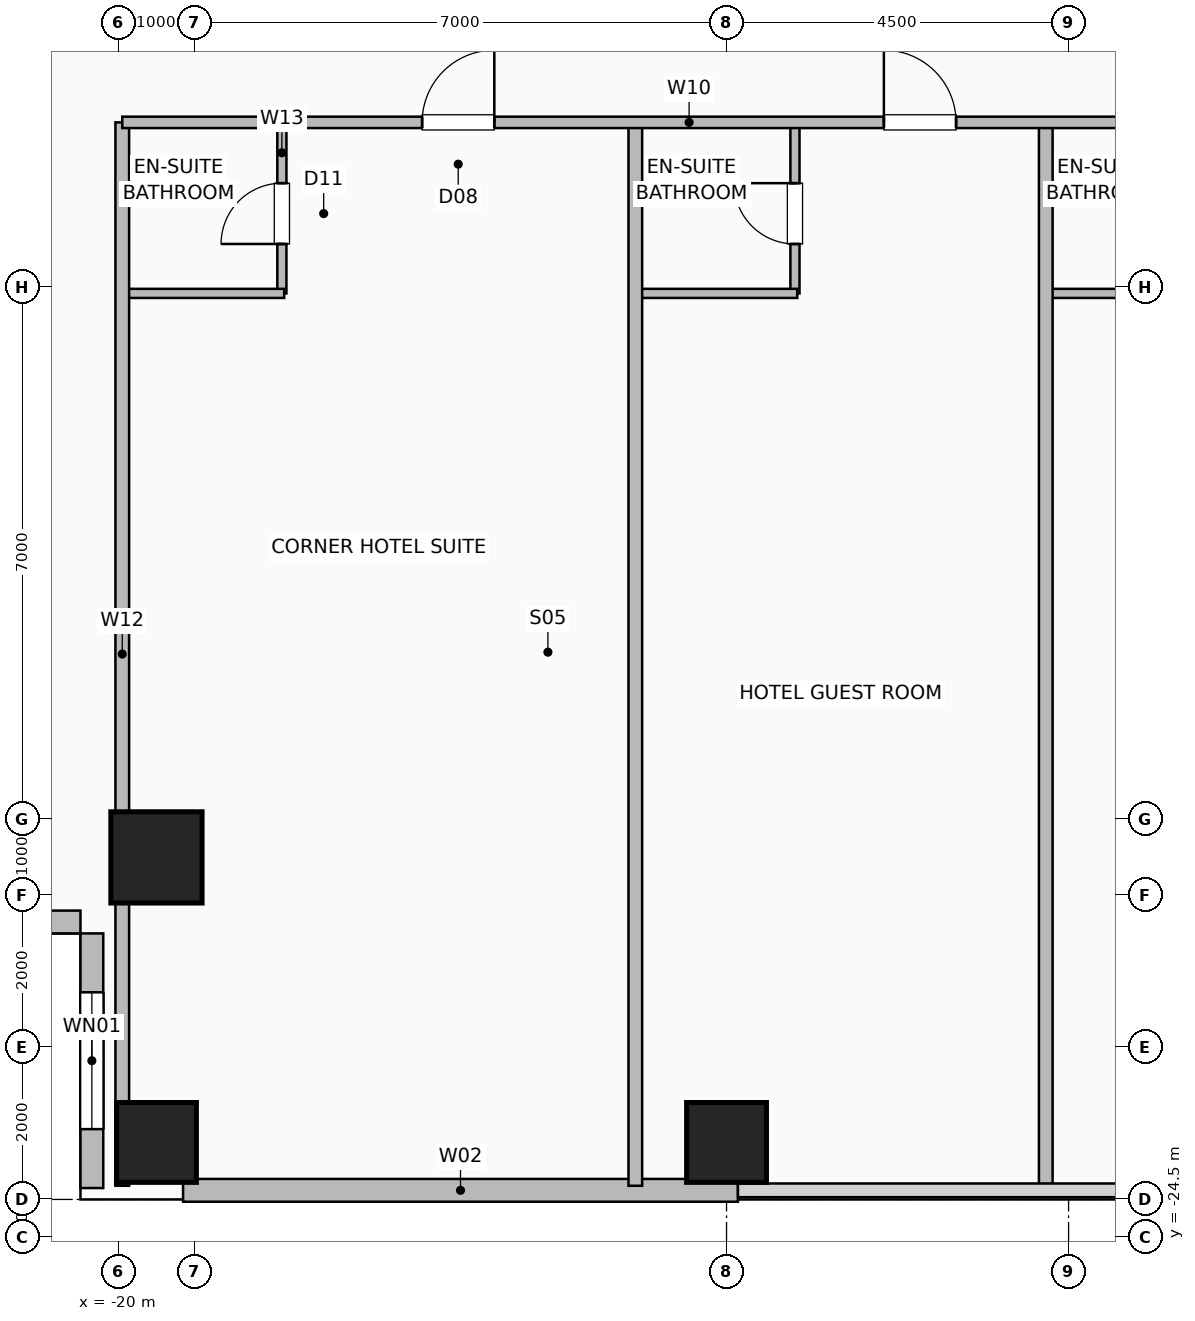
"""IFC4 building model, lengths in metres.
Left out: names, types, materials, properties, quantities, classifications, styles, units other than length and angle.
Written with IfcOpenShell. Run it as: python <this file> out.ifc"""

import sys

from ifc_helpers import new_model, si_unit, direction, frame, frame_2d, origin, origin_2d, place, context, subcontext, project, spatial, rectangle, hollow_rectangle, extrude, element, fill, save


model = new_model("IFC4")
c1 = context("Model", 3, precision=1e-05, world=origin(), true_north=direction((0.0, 1.0)))
c2 = subcontext(c1, "Body", "Model", "MODEL_VIEW")
j1 = project(units=[si_unit("LENGTHUNIT", "METRE"), si_unit("PLANEANGLEUNIT", "RADIAN")], contexts=[c1])
p1 = place(None, origin())
s1 = spatial("IfcSite", under=j1, at=p1, CompositionType="ELEMENT")
p2 = place(p1, origin())
s2 = spatial("IfcBuilding", under=s1, at=p2, CompositionType="ELEMENT")
p3 = place(p2, frame((0.0, 0.0, 34.0)))
s3 = spatial("IfcBuildingStorey", under=s2, at=p3, CompositionType="ELEMENT", Elevation=34.0)
for number, where, z_axis, x_axis in (
    (1, (-19.5, -23.25, 0.0), (0.0, 0.0, 1.0), (1.0, 0.0, 0.0)),
    (2, (-12.0, -23.25, 0.0), (0.0, 0.0, 1.0), (1.0, 0.0, 0.0)),
):
    element("IfcColumn", number, at=place(p3, frame(where, z_axis=z_axis, x_axis=x_axis)), inside=s3, PredefinedType="COLUMN", context=c2, shape_type="SweptSolid", body=[
        extrude(hollow_rectangle(XDim=1.05, YDim=1.05, WallThickness=0.05, at=origin_2d()), origin(), (0.0, 0.0, 1.0), 3.5),
    ])
p4 = place(p3, frame((-19.5, -19.5, 0.0), z_axis=(0.0, 0.0, 1.0), x_axis=(1.0, 0.0, 0.0)))
e3 = element("IfcColumn", 3, at=p4, inside=s3, PredefinedType="COLUMN", context=c2, shape_type="SweptSolid", body=[
    extrude(hollow_rectangle(XDim=1.2, YDim=1.2, WallThickness=0.055, at=origin_2d()), origin(), (0.0, 0.0, 1.0), 3.5),
])
p5 = place(p3, frame((-19.15, -23.88, 0.0), z_axis=(0.0, 0.0, 1.0), x_axis=(1.0, 0.0, 0.0)))
e4 = element("IfcWall", 4, at=p5, inside=s3, PredefinedType="SOLIDWALL", context=c2, shape_type="SweptSolid", body=[
    extrude(rectangle(XDim=7.3, YDim=0.3, at=frame_2d((3.65, 0.0))), origin(), (0.0, 0.0, 1.0), 3.25),
])
p6 = place(p3, frame((-20.35, -23.85, 0.0), z_axis=(0.0, 0.0, 1.0), x_axis=(0.0, 1.0, 0.0)))
e5 = element("IfcWall", 5, at=p6, inside=s3, PredefinedType="SOLIDWALL", context=c2, shape_type="SweptSolid", body=[
    extrude(rectangle(XDim=3.35, YDim=0.3, at=frame_2d((1.675, 0.0))), origin(), (0.0, 0.0, 1.0), 3.25),
])
p7 = place(p6, frame((0.775, 0.0, 0.9)))
e6 = element("IfcOpeningElement", 6, at=p7, cuts=e5, PredefinedType="OPENING", context=c2, shape_type="SweptSolid", body=[
    extrude(rectangle(XDim=1.8, YDim=1.8, at=frame_2d((0.9, 0.9))), frame((0.0, 0.16, 0.0), z_axis=(0.0, -1.0, 0.0), x_axis=(1.0, 0.0, 0.0)), (0.0, 0.0, 1.0), 0.32),
])
p8 = place(p3, frame((-23.85, -20.35, 0.0), z_axis=(0.0, 0.0, 1.0), x_axis=(1.0, 0.0, 0.0)))
e7 = element("IfcWall", 7, at=p8, inside=s3, PredefinedType="SOLIDWALL", context=c2, shape_type="SweptSolid", body=[
    extrude(rectangle(XDim=3.35, YDim=0.3, at=frame_2d((1.675, 0.0))), origin(), (0.0, 0.0, 1.0), 3.25),
])
p9 = place(p3, frame((-17.85, -12.08, 0.0), z_axis=(0.0, 0.0, 1.0), x_axis=(0.0, 1.0, 0.0)))
e8 = element("IfcWall", 8, at=p9, inside=s3, PredefinedType="PLUMBINGWALL", context=c2, shape_type="SweptSolid", body=[
    extrude(rectangle(XDim=2.25, YDim=0.12, at=frame_2d((1.125, 0.0))), origin(), (0.0, 0.0, 1.0), 3.25),
])
p10 = place(p9, frame((0.65, 0.0, 0.0)))
e9 = element("IfcOpeningElement", 9, at=p10, cuts=e8, PredefinedType="OPENING", context=c2, shape_type="SweptSolid", body=[
    extrude(rectangle(XDim=0.8, YDim=2.05, at=frame_2d((0.4, 1.025))), frame((0.0, 0.07, 0.0), z_axis=(0.0, -1.0, 0.0), x_axis=(1.0, 0.0, 0.0)), (0.0, 0.0, 1.0), 0.14),
])
p11 = place(p3, frame((-19.92, -12.08, 0.0), z_axis=(0.0, 0.0, 1.0), x_axis=(1.0, 0.0, 0.0)))
e10 = element("IfcWall", 10, at=p11, inside=s3, PredefinedType="PLUMBINGWALL", context=c2, shape_type="SweptSolid", body=[
    extrude(rectangle(XDim=2.1, YDim=0.12, at=frame_2d((1.05, 0.0))), origin(), (0.0, 0.0, 1.0), 3.25),
])
p12 = place(p3, frame((-11.1, -12.08, 0.0), z_axis=(0.0, 0.0, 1.0), x_axis=(0.0, 1.0, 0.0)))
e11 = element("IfcWall", 11, at=p12, inside=s3, PredefinedType="PLUMBINGWALL", context=c2, shape_type="SweptSolid", body=[
    extrude(rectangle(XDim=2.25, YDim=0.12, at=frame_2d((1.125, 0.0))), origin(), (0.0, 0.0, 1.0), 3.25),
])
p13 = place(p12, frame((0.65, 0.0, 0.0)))
e12 = element("IfcOpeningElement", 12, at=p13, cuts=e11, PredefinedType="OPENING", context=c2, shape_type="SweptSolid", body=[
    extrude(rectangle(XDim=0.8, YDim=2.05, at=frame_2d((0.4, 1.025))), frame((0.0, 0.07, 0.0), z_axis=(0.0, -1.0, 0.0), x_axis=(1.0, 0.0, 0.0)), (0.0, 0.0, 1.0), 0.14),
])
p14 = place(p3, frame((-13.17, -12.08, 0.0), z_axis=(0.0, 0.0, 1.0), x_axis=(1.0, 0.0, 0.0)))
e13 = element("IfcWall", 13, at=p14, inside=s3, PredefinedType="PLUMBINGWALL", context=c2, shape_type="SweptSolid", body=[
    extrude(rectangle(XDim=2.1, YDim=0.12, at=frame_2d((1.05, 0.0))), origin(), (0.0, 0.0, 1.0), 3.25),
])
p15 = place(p3, frame((-7.77, -12.08, 0.0), z_axis=(0.0, 0.0, 1.0), x_axis=(1.0, 0.0, 0.0)))
e14 = element("IfcWall", 14, at=p15, inside=s3, PredefinedType="PLUMBINGWALL", context=c2, shape_type="SweptSolid", body=[
    extrude(rectangle(XDim=2.1, YDim=0.12, at=frame_2d((1.05, 0.0))), origin(), (0.0, 0.0, 1.0), 3.25),
])
for number, where, z_axis, x_axis in (
    (15, (-19.95, -23.82, 0.0), (0.0, 0.0, 1.0), (0.0, 1.0, 0.0)),
    (16, (-13.2, -23.82, 0.0), (0.0, 0.0, 1.0), (0.0, 1.0, 0.0)),
    (17, (-7.8, -23.82, 0.0), (0.0, 0.0, 1.0), (0.0, 1.0, 0.0)),
):
    element("IfcWall", number, at=place(p3, frame(where, z_axis=z_axis, x_axis=x_axis)), inside=s3, PredefinedType="PARTITIONING", context=c2, shape_type="SweptSolid", body=[
        extrude(rectangle(XDim=13.99, YDim=0.18, at=frame_2d((6.995, 0.0))), origin(), (0.0, 0.0, 1.0), 3.25),
    ])
p16 = place(p3, frame((-19.95, -9.83, 0.0), z_axis=(0.0, 0.0, 1.0), x_axis=(1.0, 0.0, 0.0)))
e18 = element("IfcWall", 18, at=p16, inside=s3, PredefinedType="PARTITIONING", context=c2, shape_type="SweptSolid", body=[
    extrude(rectangle(XDim=39.9, YDim=0.15, at=frame_2d((19.95, 0.0))), origin(), (0.0, 0.0, 1.0), 3.25),
])
p17 = place(p16, frame((3.945, 0.0, 0.0)))
e19 = element("IfcOpeningElement", 19, at=p17, cuts=e18, PredefinedType="OPENING", context=c2, shape_type="SweptSolid", body=[
    extrude(rectangle(XDim=0.95, YDim=2.08, at=frame_2d((0.475, 1.04))), frame((0.0, 0.085, 0.0), z_axis=(0.0, -1.0, 0.0), x_axis=(1.0, 0.0, 0.0)), (0.0, 0.0, 1.0), 0.17),
])
p18 = place(p16, frame((10.02, 0.0, 0.0)))
e20 = element("IfcOpeningElement", 20, at=p18, cuts=e18, PredefinedType="OPENING", context=c2, shape_type="SweptSolid", body=[
    extrude(rectangle(XDim=0.95, YDim=2.08, at=frame_2d((0.475, 1.04))), frame((0.0, 0.085, 0.0), z_axis=(0.0, -1.0, 0.0), x_axis=(1.0, 0.0, 0.0)), (0.0, 0.0, 1.0), 0.17),
])
p19 = place(p16, frame((15.42, 0.0, 0.0)))
e21 = element("IfcOpeningElement", 21, at=p19, cuts=e18, PredefinedType="OPENING", context=c2, shape_type="SweptSolid", body=[
    extrude(rectangle(XDim=0.95, YDim=2.08, at=frame_2d((0.475, 1.04))), frame((0.0, 0.085, 0.0), z_axis=(0.0, -1.0, 0.0), x_axis=(1.0, 0.0, 0.0)), (0.0, 0.0, 1.0), 0.17),
])
p20 = place(p16, frame((20.702, 0.0, 0.0)))
e22 = element("IfcOpeningElement", 22, at=p20, cuts=e18, PredefinedType="OPENING", context=c2, shape_type="SweptSolid", body=[
    extrude(rectangle(XDim=0.95, YDim=2.08, at=frame_2d((0.475, 1.04))), frame((0.0, 0.085, 0.0), z_axis=(0.0, -1.0, 0.0), x_axis=(1.0, 0.0, 0.0)), (0.0, 0.0, 1.0), 0.17),
])
p21 = place(p16, frame((26.02, 0.0, 0.0)))
e23 = element("IfcOpeningElement", 23, at=p21, cuts=e18, PredefinedType="OPENING", context=c2, shape_type="SweptSolid", body=[
    extrude(rectangle(XDim=0.95, YDim=2.08, at=frame_2d((0.475, 1.04))), frame((0.0, 0.085, 0.0), z_axis=(0.0, -1.0, 0.0), x_axis=(1.0, 0.0, 0.0)), (0.0, 0.0, 1.0), 0.17),
])
p22 = place(p16, frame((31.37, 0.0, 0.0)))
e24 = element("IfcOpeningElement", 24, at=p22, cuts=e18, PredefinedType="OPENING", context=c2, shape_type="SweptSolid", body=[
    extrude(rectangle(XDim=0.95, YDim=2.08, at=frame_2d((0.475, 1.04))), frame((0.0, 0.085, 0.0), z_axis=(0.0, -1.0, 0.0), x_axis=(1.0, 0.0, 0.0)), (0.0, 0.0, 1.0), 0.17),
])
p23 = place(p16, frame((37.245, 0.0, 0.0)))
e25 = element("IfcOpeningElement", 25, at=p23, cuts=e18, PredefinedType="OPENING", context=c2, shape_type="SweptSolid", body=[
    extrude(rectangle(XDim=0.95, YDim=2.08, at=frame_2d((0.475, 1.04))), frame((0.0, 0.085, 0.0), z_axis=(0.0, -1.0, 0.0), x_axis=(1.0, 0.0, 0.0)), (0.0, 0.0, 1.0), 0.17),
])
p24 = place(p7, origin())
e26 = element("IfcWindow", 26, at=p24, inside=s3, PartitioningType="SINGLE_PANEL", PredefinedType="WINDOW", context=c2, shape_type="SweptSolid", body=[
    extrude(rectangle(XDim=1.8, YDim=1.8, at=frame_2d((0.9, 0.9))), frame((0.0, 0.03, 0.0), z_axis=(0.0, -1.0, 0.0), x_axis=(1.0, 0.0, 0.0)), (0.0, 0.0, 1.0), 0.06),
])
fill(e6, e26)
p25 = place(p10, origin())
e27 = element("IfcDoor", 27, at=p25, inside=s3, OperationType="SINGLE_SWING_LEFT", PredefinedType="DOOR", context=c2, shape_type="SweptSolid", body=[
    extrude(rectangle(XDim=0.8, YDim=2.05, at=frame_2d((0.4, 1.025))), frame((0.0, 0.025, 0.0), z_axis=(0.0, -1.0, 0.0), x_axis=(1.0, 0.0, 0.0)), (0.0, 0.0, 1.0), 0.05),
])
fill(e9, e27)
p26 = place(p13, origin())
e28 = element("IfcDoor", 28, at=p26, inside=s3, OperationType="SINGLE_SWING_RIGHT", PredefinedType="DOOR", context=c2, shape_type="SweptSolid", body=[
    extrude(rectangle(XDim=0.8, YDim=2.05, at=frame_2d((0.4, 1.025))), frame((0.0, 0.025, 0.0), z_axis=(0.0, -1.0, 0.0), x_axis=(1.0, 0.0, 0.0)), (0.0, 0.0, 1.0), 0.05),
])
fill(e12, e28)
p27 = place(p17, origin())
e29 = element("IfcDoor", 29, at=p27, inside=s3, OperationType="SINGLE_SWING_RIGHT", PredefinedType="DOOR", context=c2, shape_type="SweptSolid", body=[
    extrude(rectangle(XDim=0.95, YDim=2.08, at=frame_2d((0.475, 1.04))), frame((0.0, 0.025, 0.0), z_axis=(0.0, -1.0, 0.0), x_axis=(1.0, 0.0, 0.0)), (0.0, 0.0, 1.0), 0.05),
])
fill(e19, e29)
p28 = place(p18, origin())
e30 = element("IfcDoor", 30, at=p28, inside=s3, OperationType="SINGLE_SWING_LEFT", PredefinedType="DOOR", context=c2, shape_type="SweptSolid", body=[
    extrude(rectangle(XDim=0.95, YDim=2.08, at=frame_2d((0.475, 1.04))), frame((0.0, 0.025, 0.0), z_axis=(0.0, -1.0, 0.0), x_axis=(1.0, 0.0, 0.0)), (0.0, 0.0, 1.0), 0.05),
])
fill(e20, e30)
save(model, sys.argv[1])
